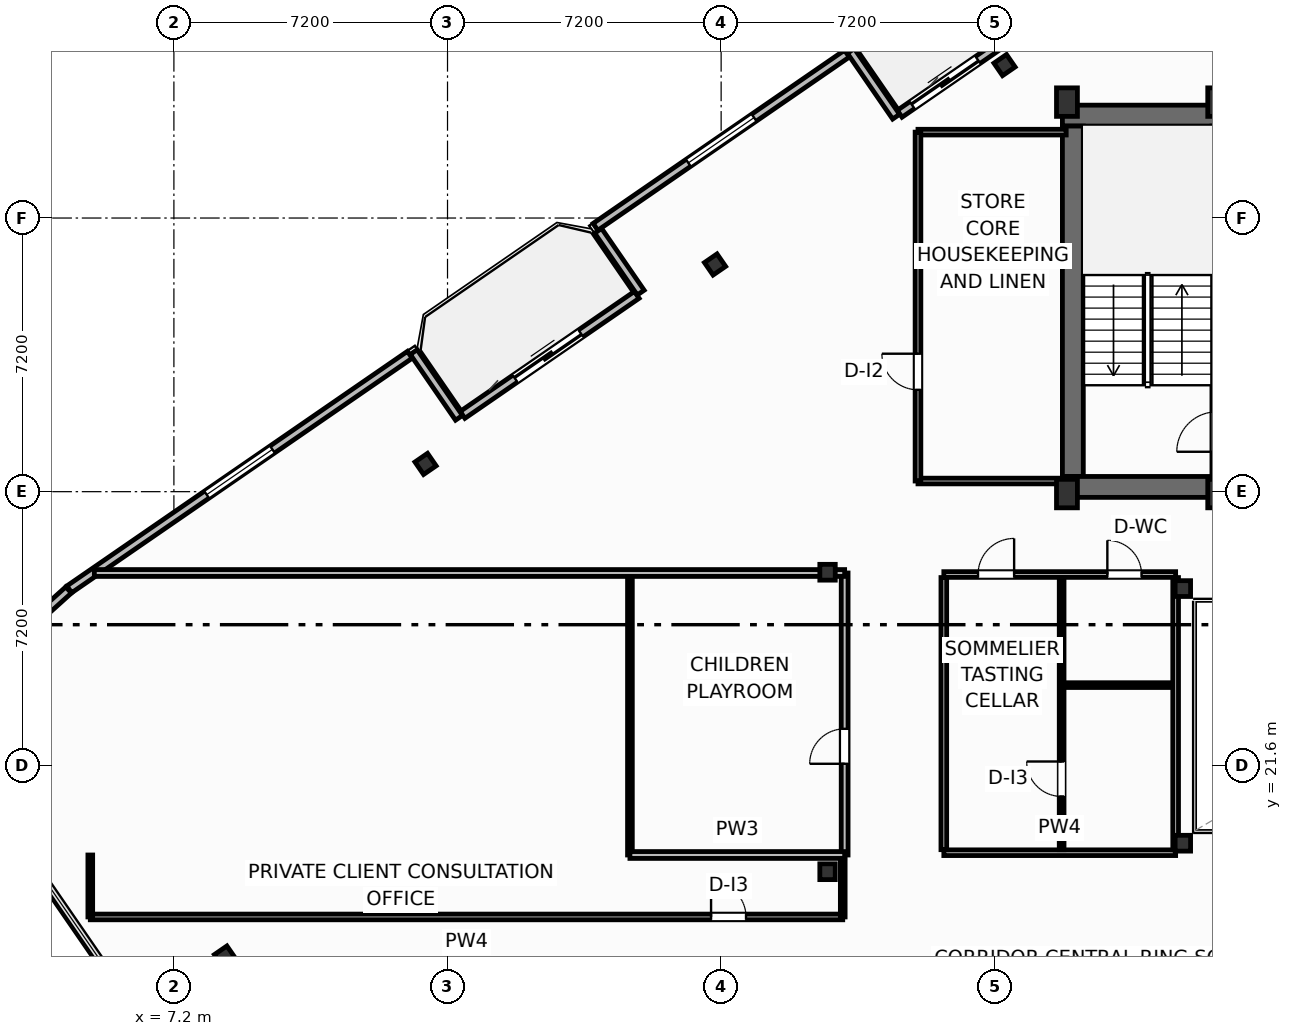
"""IFC4 building model, lengths in metres.
Left out: names, types, materials, properties, quantities, classifications, styles, units other than length and angle.
Written with IfcOpenShell. Run it as: python <this file> out.ifc"""

import sys

from ifc_helpers import new_model, si_unit, direction, frame, frame_2d, origin, origin_2d, place, context, subcontext, project, spatial, rectangle, i_section, extrude, element, fill, save


model = new_model("IFC4")
c1 = context("Model", 3, precision=1e-05, world=origin(), true_north=direction((0.0, 1.0)))
c2 = subcontext(c1, "Body", "Model", "MODEL_VIEW")
j1 = project(units=[si_unit("LENGTHUNIT", "METRE"), si_unit("PLANEANGLEUNIT", "RADIAN")], contexts=[c1])
p1 = place(None, origin())
s1 = spatial("IfcSite", under=j1, at=p1, CompositionType="ELEMENT")
p2 = place(p1, origin())
s2 = spatial("IfcBuilding", under=s1, at=p2, CompositionType="ELEMENT")
p3 = place(p2, frame((0.0, 0.0, 261.9)))
s3 = spatial("IfcBuildingStorey", under=s2, at=p3, CompositionType="ELEMENT", Elevation=261.9)
for number, where, z_axis, x_axis in (
    (1, (30.7, 28.75, 0.0), (0.0, 0.0, 1.0), (1.0, 0.0, 0.0)),
    (2, (34.68, 28.75, 0.0), (0.0, 0.0, 1.0), (1.0, 0.0, 0.0)),
    (3, (30.7, 39.05, 0.0), (0.0, 0.0, 1.0), (1.0, 0.0, 0.0)),
    (4, (34.68, 39.05, 0.0), (0.0, 0.0, 1.0), (1.0, 0.0, 0.0)),
):
    element("IfcColumn", number, at=place(p3, frame(where, z_axis=z_axis, x_axis=x_axis)), inside=s3, PredefinedType="COLUMN", context=c2, shape_type="SweptSolid", body=[
        extrude(rectangle(XDim=0.55, YDim=0.75, at=origin_2d()), origin(), (0.0, 0.0, 1.0), 3.7),
    ])
for number, where, z_axis, x_axis in (
    (5, (33.75, 19.55, 0.0), (0.0, 0.0, 1.0), (1.0, 0.0, 0.0)),
    (6, (33.75, 26.25, 0.0), (0.0, 0.0, 1.0), (1.0, 0.0, 0.0)),
    (7, (24.4, 18.8, 0.0), (0.0, 0.0, 1.0), (1.0, 0.0, 0.0)),
    (8, (24.4, 26.68, 0.0), (0.0, 0.0, 1.0), (1.0, 0.0, 0.0)),
):
    element("IfcColumn", number, at=place(p3, frame(where, z_axis=z_axis, x_axis=x_axis)), inside=s3, PredefinedType="COLUMN", context=c2, shape_type="SweptSolid", body=[
        extrude(i_section(OverallWidth=0.406, OverallDepth=0.416, WebThickness=0.03, FlangeThickness=0.048, FilletRadius=0.025, at=origin_2d()), origin(), (0.0, 0.0, 1.0), 3.7),
    ])
p4 = place(p3, frame((30.58, 38.695, 0.0), z_axis=(0.0, 0.0, 1.0), x_axis=(1.0, 0.0, 0.0)))
e9 = element("IfcWall", 9, at=p4, inside=s3, PredefinedType="SHEAR", context=c2, shape_type="SweptSolid", body=[
    extrude(rectangle(XDim=17.24, YDim=0.55, at=frame_2d((8.62, 0.0))), origin(), (0.0, 0.0, 1.0), 3.45),
])
p5 = place(p3, frame((30.855, 29.2, 0.0), z_axis=(0.0, 0.0, 1.0), x_axis=(0.0, 1.0, 0.0)))
e10 = element("IfcWall", 10, at=p5, inside=s3, PredefinedType="SHEAR", context=c2, shape_type="SweptSolid", body=[
    extrude(rectangle(XDim=9.22, YDim=0.55, at=frame_2d((4.61, 0.0))), origin(), (0.0, 0.0, 1.0), 3.45),
])
p6 = place(p3, frame((30.58, 28.925, 0.0), z_axis=(0.0, 0.0, 1.0), x_axis=(1.0, 0.0, 0.0)))
e11 = element("IfcWall", 11, at=p6, inside=s3, PredefinedType="SHEAR", context=c2, shape_type="SweptSolid", body=[
    extrude(rectangle(XDim=4.22, YDim=0.55, at=frame_2d((2.11, 0.0))), origin(), (0.0, 0.0, 1.0), 3.45),
])
p7 = place(p3, frame((34.64, 29.2, 0.0), z_axis=(0.0, 0.0, 1.0), x_axis=(0.0, 1.0, 0.0)))
e12 = element("IfcWall", 12, at=p7, inside=s3, PredefinedType="SHEAR", context=c2, shape_type="SweptSolid", body=[
    extrude(rectangle(XDim=9.22, YDim=0.25, at=frame_2d((4.61, 0.0))), origin(), (0.0, 0.0, 1.0), 3.45),
])
p8 = place(p7, frame((0.65, 0.0, 0.0)))
e13 = element("IfcOpeningElement", 13, at=p8, cuts=e12, PredefinedType="OPENING", context=c2, shape_type="SweptSolid", body=[
    extrude(rectangle(XDim=1.05, YDim=2.15, at=frame_2d((0.525, 1.075))), frame((0.0, 0.135, 0.0), z_axis=(0.0, -1.0, 0.0), x_axis=(1.0, 0.0, 0.0)), (0.0, 0.0, 1.0), 0.27),
])
for number, where, z_axis, x_axis in (
    (14, (29.057, 40.025, 0.0), (0.0, 0.0, 1.0), (0.824, 0.567, 0.0)),
    (15, (21.44, 34.778, 0.0), (0.0, 0.0, 1.0), (0.824, 0.567, 0.0)),
    (16, (13.822, 29.53, 0.0), (0.0, 0.0, 1.0), (0.824, 0.567, 0.0)),
    (17, (8.543, 16.569, 0.0), (0.0, 0.0, 1.0), (0.824, 0.567, 0.0)),
):
    element("IfcColumn", number, at=place(p3, frame(where, z_axis=z_axis, x_axis=x_axis)), inside=s3, PredefinedType="COLUMN", context=c2, shape_type="SweptSolid", body=[
        extrude(i_section(OverallWidth=0.401, OverallDepth=0.399, WebThickness=0.025, FlangeThickness=0.04, FilletRadius=0.022, at=origin_2d()), origin(), (0.0, 0.0, 1.0), 3.7),
    ])
p9 = place(p3, frame((14.795, 30.82, 0.0), z_axis=(0.0, 0.0, 1.0), x_axis=(0.823541290762, 0.567256328665, 0.0)))
e18 = element("IfcWall", 18, at=p9, inside=s3, PredefinedType="SOLIDWALL", context=c2, shape_type="SweptSolid", body=[
    extrude(rectangle(XDim=5.567, YDim=0.22, at=frame_2d((2.784, 0.0))), origin(), (0.0, 0.0, 1.0), 2.73),
])
p10 = place(p9, frame((1.68, 0.0, 0.0)))
e19 = element("IfcOpeningElement", 19, at=p10, cuts=e18, PredefinedType="OPENING", context=c2, shape_type="SweptSolid", body=[
    extrude(rectangle(XDim=2.1, YDim=2.3, at=frame_2d((1.05, 1.15))), frame((0.0, 0.12, 0.0), z_axis=(0.0, -1.0, 0.0), x_axis=(1.0, 0.0, 0.0)), (0.0, 0.0, 1.0), 0.24),
])
p11 = place(p3, frame((26.297, 38.743, 0.0), z_axis=(0.0, 0.0, 1.0), x_axis=(0.823534636215, 0.567265989598, 0.0)))
e20 = element("IfcWall", 20, at=p11, inside=s3, PredefinedType="SOLIDWALL", context=c2, shape_type="SweptSolid", body=[
    extrude(rectangle(XDim=6.0, YDim=0.22, at=frame_2d((3.0, 0.0))), origin(), (0.0, 0.0, 1.0), 2.73),
])
p12 = place(p11, frame((0.4, 0.0, 0.0)))
e21 = element("IfcOpeningElement", 21, at=p12, cuts=e20, PredefinedType="OPENING", context=c2, shape_type="SweptSolid", body=[
    extrude(rectangle(XDim=2.1, YDim=2.3, at=frame_2d((1.05, 1.15))), frame((0.0, 0.12, 0.0), z_axis=(0.0, -1.0, 0.0), x_axis=(1.0, 0.0, 0.0)), (0.0, 0.0, 1.0), 0.24),
])
p13 = place(p3, frame((26.204, 38.667, 0.0), z_axis=(0.0, 0.0, 1.0), x_axis=(-0.567219383419, 0.823566737474, 0.0)))
e22 = element("IfcWall", 22, at=p13, inside=s3, PredefinedType="SOLIDWALL", context=c2, shape_type="SweptSolid", body=[
    extrude(rectangle(XDim=2.1, YDim=0.22, at=frame_2d((1.05, 0.0))), origin(), (0.0, 0.0, 1.0), 2.73),
])
p14 = place(p3, frame((24.91, 40.325, 0.0), z_axis=(0.0, 0.0, 1.0), x_axis=(-0.823521165086, -0.56728554596, 0.0)))
e23 = element("IfcWall", 23, at=p14, inside=s3, PredefinedType="SOLIDWALL", context=c2, shape_type="SweptSolid", body=[
    extrude(rectangle(XDim=8.035, YDim=0.22, at=frame_2d((4.018, 0.0))), origin(), (0.0, 0.0, 1.0), 2.73),
])
p15 = place(p14, frame((2.968, 0.0, 0.8)))
e24 = element("IfcOpeningElement", 24, at=p15, cuts=e23, PredefinedType="OPENING", context=c2, shape_type="SweptSolid", body=[
    extrude(rectangle(XDim=2.1, YDim=1.75, at=frame_2d((1.05, 0.875))), frame((0.0, 0.12, 0.0), z_axis=(0.0, -1.0, 0.0), x_axis=(1.0, 0.0, 0.0)), (0.0, 0.0, 1.0), 0.24),
])
p16 = place(p3, frame((18.364, 35.664, 0.0), z_axis=(0.0, 0.0, 1.0), x_axis=(0.567215821234, -0.823569190865, 0.0)))
e25 = element("IfcWall", 25, at=p16, inside=s3, PredefinedType="SOLIDWALL", context=c2, shape_type="SweptSolid", body=[
    extrude(rectangle(XDim=1.975, YDim=0.22, at=frame_2d((0.988, 0.0))), origin(), (0.0, 0.0, 1.0), 2.73),
])
p17 = place(p3, frame((14.702, 30.744, 0.0), z_axis=(0.0, 0.0, 1.0), x_axis=(-0.567352541689, 0.823475010816, 0.0)))
e26 = element("IfcWall", 26, at=p17, inside=s3, PredefinedType="SOLIDWALL", context=c2, shape_type="SweptSolid", body=[
    extrude(rectangle(XDim=2.1, YDim=0.22, at=frame_2d((1.05, 0.0))), origin(), (0.0, 0.0, 1.0), 2.73),
])
p18 = place(p3, frame((13.408, 32.402, 0.0), z_axis=(0.0, 0.0, 1.0), x_axis=(-0.823527634633, -0.567276154087, 0.0)))
e27 = element("IfcWall", 27, at=p18, inside=s3, PredefinedType="SOLIDWALL", context=c2, shape_type="SweptSolid", body=[
    extrude(rectangle(XDim=10.88, YDim=0.22, at=frame_2d((5.44, 0.0))), origin(), (0.0, 0.0, 1.0), 2.73),
])
p19 = place(p18, frame((4.39, 0.0, 0.8)))
e28 = element("IfcOpeningElement", 28, at=p19, cuts=e27, PredefinedType="OPENING", context=c2, shape_type="SweptSolid", body=[
    extrude(rectangle(XDim=2.1, YDim=1.75, at=frame_2d((1.05, 0.875))), frame((0.0, 0.12, 0.0), z_axis=(0.0, -1.0, 0.0), x_axis=(1.0, 0.0, 0.0)), (0.0, 0.0, 1.0), 0.24),
])
p20 = place(p3, frame((4.429, 26.213, 0.0), z_axis=(0.0, 0.0, 1.0), x_axis=(-0.742414330744, -0.669941013453, 0.0)))
e29 = element("IfcWall", 29, at=p20, inside=s3, PredefinedType="SOLIDWALL", context=c2, shape_type="SweptSolid", body=[
    extrude(rectangle(XDim=1.257, YDim=0.22, at=frame_2d((0.628, 0.0))), origin(), (0.0, 0.0, 1.0), 2.73),
])
p21 = place(p3, frame((5.0, 17.61, 0.0), z_axis=(0.0, 0.0, 1.0), x_axis=(1.0, 0.0, 0.0)))
e30 = element("IfcWall", 30, at=p21, inside=s3, PredefinedType="PARTITIONING", context=c2, shape_type="SweptSolid", body=[
    extrude(rectangle(XDim=19.8, YDim=0.15, at=frame_2d((9.9, 0.0))), origin(), (0.0, 0.0, 1.0), 2.739),
])
p22 = place(p21, frame((16.335, 0.0, 0.0)))
e31 = element("IfcOpeningElement", 31, at=p22, cuts=e30, PredefinedType="OPENING", context=c2, shape_type="SweptSolid", body=[
    extrude(rectangle(XDim=0.92, YDim=2.05, at=frame_2d((0.46, 1.025))), frame((0.0, 0.085, 0.0), z_axis=(0.0, -1.0, 0.0), x_axis=(1.0, 0.0, 0.0)), (0.0, 0.0, 1.0), 0.17),
])
for number, where, z_axis, x_axis in (
    (32, (5.0, 17.61, 0.0), (0.0, 0.0, 1.0), (0.0, 1.0, 0.0)),
    (33, (24.8, 17.61, 0.0), (0.0, 0.0, 1.0), (0.0, 1.0, 0.0)),
):
    element("IfcWall", number, at=place(p3, frame(where, z_axis=z_axis, x_axis=x_axis)), inside=s3, PredefinedType="PARTITIONING", context=c2, shape_type="SweptSolid", body=[
        extrude(rectangle(XDim=1.63, YDim=0.125, at=frame_2d((0.815, 0.0))), origin(), (0.0, 0.0, 1.0), 3.45),
    ])
p23 = place(p3, frame((24.85, 19.24, 0.0), z_axis=(0.0, 0.0, 1.0), x_axis=(0.0, 1.0, 0.0)))
e34 = element("IfcWall", 34, at=p23, inside=s3, PredefinedType="PARTITIONING", context=c2, shape_type="SweptSolid", body=[
    extrude(rectangle(XDim=7.42, YDim=0.18, at=frame_2d((3.71, 0.0))), origin(), (0.0, 0.0, 1.0), 3.45),
])
p24 = place(p23, frame((2.4, 0.0, 0.0)))
e35 = element("IfcOpeningElement", 35, at=p24, cuts=e34, PredefinedType="OPENING", context=c2, shape_type="SweptSolid", body=[
    extrude(rectangle(XDim=0.92, YDim=2.05, at=frame_2d((0.46, 1.025))), frame((0.0, 0.1, 0.0), z_axis=(0.0, -1.0, 0.0), x_axis=(1.0, 0.0, 0.0)), (0.0, 0.0, 1.0), 0.2),
])
p25 = place(p3, frame((19.2, 19.24, 0.0), z_axis=(0.0, 0.0, 1.0), x_axis=(0.0, 1.0, 0.0)))
e36 = element("IfcWall", 36, at=p25, inside=s3, PredefinedType="PARTITIONING", context=c2, shape_type="SweptSolid", body=[
    extrude(rectangle(XDim=7.42, YDim=0.125, at=frame_2d((3.71, 0.0))), origin(), (0.0, 0.0, 1.0), 3.45),
])
p26 = place(p3, frame((19.2, 19.24, 0.0), z_axis=(0.0, 0.0, 1.0), x_axis=(1.0, 0.0, 0.0)))
e37 = element("IfcWall", 37, at=p26, inside=s3, PredefinedType="PARTITIONING", context=c2, shape_type="SweptSolid", body=[
    extrude(rectangle(XDim=5.65, YDim=0.18, at=frame_2d((2.825, 0.0))), origin(), (0.0, 0.0, 1.0), 3.45),
])
p27 = place(p3, frame((5.107, 26.66, 0.0), z_axis=(0.0, 0.0, 1.0), x_axis=(1.0, 0.0, 0.0)))
e38 = element("IfcWall", 38, at=p27, inside=s3, PredefinedType="PARTITIONING", context=c2, shape_type="SweptSolid", body=[
    extrude(rectangle(XDim=19.743, YDim=0.18, at=frame_2d((9.872, 0.0))), origin(), (0.0, 0.0, 1.0), 2.662),
])
p28 = place(p3, frame((27.46, 26.62, 0.0), z_axis=(0.0, 0.0, 1.0), x_axis=(1.0, 0.0, 0.0)))
e39 = element("IfcWall", 39, at=p28, inside=s3, PredefinedType="PARTITIONING", context=c2, shape_type="SweptSolid", body=[
    extrude(rectangle(XDim=6.1, YDim=0.15, at=frame_2d((3.05, 0.0))), origin(), (0.0, 0.0, 1.0), 2.662),
])
p29 = place(p28, frame((0.9, 0.0, 0.0)))
e40 = element("IfcOpeningElement", 40, at=p29, cuts=e39, PredefinedType="OPENING", context=c2, shape_type="SweptSolid", body=[
    extrude(rectangle(XDim=0.95, YDim=2.05, at=frame_2d((0.475, 1.025))), frame((0.0, 0.085, 0.0), z_axis=(0.0, -1.0, 0.0), x_axis=(1.0, 0.0, 0.0)), (0.0, 0.0, 1.0), 0.17),
])
p30 = place(p28, frame((4.303, 0.0, 0.0)))
e41 = element("IfcOpeningElement", 41, at=p30, cuts=e39, PredefinedType="OPENING", context=c2, shape_type="SweptSolid", body=[
    extrude(rectangle(XDim=0.9, YDim=2.05, at=frame_2d((0.45, 1.025))), frame((0.0, 0.085, 0.0), z_axis=(0.0, -1.0, 0.0), x_axis=(1.0, 0.0, 0.0)), (0.0, 0.0, 1.0), 0.17),
])
p31 = place(p3, frame((27.46, 19.3, 0.0), z_axis=(0.0, 0.0, 1.0), x_axis=(1.0, 0.0, 0.0)))
e42 = element("IfcWall", 42, at=p31, inside=s3, PredefinedType="PARTITIONING", context=c2, shape_type="SweptSolid", body=[
    extrude(rectangle(XDim=6.1, YDim=0.15, at=frame_2d((3.05, 0.0))), origin(), (0.0, 0.0, 1.0), 2.662),
])
p32 = place(p3, frame((30.56, 19.38, 0.0), z_axis=(0.0, 0.0, 1.0), x_axis=(0.0, 1.0, 0.0)))
e43 = element("IfcWall", 43, at=p32, inside=s3, PredefinedType="PARTITIONING", context=c2, shape_type="SweptSolid", body=[
    extrude(rectangle(XDim=7.16, YDim=0.125, at=frame_2d((3.58, 0.0))), origin(), (0.0, 0.0, 1.0), 3.45),
])
p33 = place(p32, frame((1.4, 0.0, 0.0)))
e44 = element("IfcOpeningElement", 44, at=p33, cuts=e43, PredefinedType="OPENING", context=c2, shape_type="SweptSolid", body=[
    extrude(rectangle(XDim=0.92, YDim=2.05, at=frame_2d((0.46, 1.025))), frame((0.0, 0.073, 0.0), z_axis=(0.0, -1.0, 0.0), x_axis=(1.0, 0.0, 0.0)), (0.0, 0.0, 1.0), 0.145),
])
p34 = place(p3, frame((30.64, 23.71, 0.0), z_axis=(0.0, 0.0, 1.0), x_axis=(1.0, 0.0, 0.0)))
e45 = element("IfcWall", 45, at=p34, inside=s3, PredefinedType="PARTITIONING", context=c2, shape_type="SweptSolid", body=[
    extrude(rectangle(XDim=2.88, YDim=0.125, at=frame_2d((1.44, 0.0))), origin(), (0.0, 0.0, 1.0), 3.45),
])
p35 = place(p3, frame((27.46, 19.38, 0.0), z_axis=(0.0, 0.0, 1.0), x_axis=(0.0, 1.0, 0.0)))
e46 = element("IfcWall", 46, at=p35, inside=s3, PredefinedType="PARTITIONING", context=c2, shape_type="SweptSolid", body=[
    extrude(rectangle(XDim=7.16, YDim=0.15, at=frame_2d((3.58, 0.0))), origin(), (0.0, 0.0, 1.0), 3.45),
])
p36 = place(p3, frame((33.56, 19.38, 0.0), z_axis=(0.0, 0.0, 1.0), x_axis=(0.0, 1.0, 0.0)))
e47 = element("IfcWall", 47, at=p36, inside=s3, PredefinedType="PARTITIONING", context=c2, shape_type="SweptSolid", body=[
    extrude(rectangle(XDim=7.16, YDim=0.15, at=frame_2d((3.58, 0.0))), origin(), (0.0, 0.0, 1.0), 2.824),
])
p37 = place(p3, frame((26.78, 29.08, 0.0), z_axis=(0.0, 0.0, 1.0), x_axis=(1.0, 0.0, 0.0)))
e48 = element("IfcWall", 48, at=p37, inside=s3, PredefinedType="PARTITIONING", context=c2, shape_type="SweptSolid", body=[
    extrude(rectangle(XDim=3.8, YDim=0.15, at=frame_2d((1.9, 0.0))), origin(), (0.0, 0.0, 1.0), 3.45),
])
p38 = place(p3, frame((26.78, 38.26, 0.0), z_axis=(0.0, 0.0, 1.0), x_axis=(1.0, 0.0, 0.0)))
e49 = element("IfcWall", 49, at=p38, inside=s3, PredefinedType="PARTITIONING", context=c2, shape_type="SweptSolid", body=[
    extrude(rectangle(XDim=3.9, YDim=0.15, at=frame_2d((1.95, 0.0))), origin(), (0.0, 0.0, 1.0), 3.45),
])
p39 = place(p3, frame((26.78, 29.08, 0.0), z_axis=(0.0, 0.0, 1.0), x_axis=(0.0, 1.0, 0.0)))
e50 = element("IfcWall", 50, at=p39, inside=s3, PredefinedType="PARTITIONING", context=c2, shape_type="SweptSolid", body=[
    extrude(rectangle(XDim=9.18, YDim=0.15, at=frame_2d((4.59, 0.0))), origin(), (0.0, 0.0, 1.0), 3.45),
])
p40 = place(p39, frame((2.4, 0.0, 0.0)))
e51 = element("IfcOpeningElement", 51, at=p40, cuts=e50, PredefinedType="OPENING", context=c2, shape_type="SweptSolid", body=[
    extrude(rectangle(XDim=0.95, YDim=2.05, at=frame_2d((0.475, 1.025))), frame((0.0, 0.085, 0.0), z_axis=(0.0, -1.0, 0.0), x_axis=(1.0, 0.0, 0.0)), (0.0, 0.0, 1.0), 0.17),
])
p41 = place(p10, origin())
e52 = element("IfcDoor", 52, at=p41, inside=s3, OperationType="SLIDING_TO_LEFT", PredefinedType="DOOR", context=c2, shape_type="SweptSolid", body=[
    extrude(rectangle(XDim=2.1, YDim=2.3, at=frame_2d((1.05, 1.15))), frame((0.0, 0.025, 0.0), z_axis=(0.0, -1.0, 0.0), x_axis=(1.0, 0.0, 0.0)), (0.0, 0.0, 1.0), 0.05),
])
fill(e19, e52)
p42 = place(p12, origin())
e53 = element("IfcDoor", 53, at=p42, inside=s3, OperationType="SLIDING_TO_LEFT", PredefinedType="DOOR", context=c2, shape_type="SweptSolid", body=[
    extrude(rectangle(XDim=2.1, YDim=2.3, at=frame_2d((1.05, 1.15))), frame((0.0, 0.025, 0.0), z_axis=(0.0, -1.0, 0.0), x_axis=(1.0, 0.0, 0.0)), (0.0, 0.0, 1.0), 0.05),
])
fill(e21, e53)
p43 = place(p15, origin())
e54 = element("IfcWindow", 54, at=p43, inside=s3, PartitioningType="SINGLE_PANEL", PredefinedType="WINDOW", context=c2, shape_type="SweptSolid", body=[
    extrude(rectangle(XDim=2.1, YDim=1.75, at=frame_2d((1.05, 0.875))), frame((0.0, 0.03, 0.0), z_axis=(0.0, -1.0, 0.0), x_axis=(1.0, 0.0, 0.0)), (0.0, 0.0, 1.0), 0.06),
])
fill(e24, e54)
p44 = place(p19, origin())
e55 = element("IfcWindow", 55, at=p44, inside=s3, PartitioningType="SINGLE_PANEL", PredefinedType="WINDOW", context=c2, shape_type="SweptSolid", body=[
    extrude(rectangle(XDim=2.1, YDim=1.75, at=frame_2d((1.05, 0.875))), frame((0.0, 0.03, 0.0), z_axis=(0.0, -1.0, 0.0), x_axis=(1.0, 0.0, 0.0)), (0.0, 0.0, 1.0), 0.06),
])
fill(e28, e55)
p45 = place(p22, origin())
e56 = element("IfcDoor", 56, at=p45, inside=s3, OperationType="SINGLE_SWING_LEFT", PredefinedType="DOOR", context=c2, shape_type="SweptSolid", body=[
    extrude(rectangle(XDim=0.92, YDim=2.05, at=frame_2d((0.46, 1.025))), frame((0.0, 0.025, 0.0), z_axis=(0.0, -1.0, 0.0), x_axis=(1.0, 0.0, 0.0)), (0.0, 0.0, 1.0), 0.05),
])
fill(e31, e56)
p46 = place(p24, origin())
e57 = element("IfcDoor", 57, at=p46, inside=s3, OperationType="SINGLE_SWING_LEFT", PredefinedType="DOOR", context=c2, shape_type="SweptSolid", body=[
    extrude(rectangle(XDim=0.92, YDim=2.05, at=frame_2d((0.46, 1.025))), frame((0.0, 0.025, 0.0), z_axis=(0.0, -1.0, 0.0), x_axis=(1.0, 0.0, 0.0)), (0.0, 0.0, 1.0), 0.05),
])
fill(e35, e57)
p47 = place(p29, origin())
e58 = element("IfcDoor", 58, at=p47, inside=s3, OperationType="SINGLE_SWING_RIGHT", PredefinedType="DOOR", context=c2, shape_type="SweptSolid", body=[
    extrude(rectangle(XDim=0.95, YDim=2.05, at=frame_2d((0.475, 1.025))), frame((0.0, 0.025, 0.0), z_axis=(0.0, -1.0, 0.0), x_axis=(1.0, 0.0, 0.0)), (0.0, 0.0, 1.0), 0.05),
])
fill(e40, e58)
p48 = place(p30, origin())
e59 = element("IfcDoor", 59, at=p48, inside=s3, OperationType="SINGLE_SWING_LEFT", PredefinedType="DOOR", context=c2, shape_type="SweptSolid", body=[
    extrude(rectangle(XDim=0.9, YDim=2.05, at=frame_2d((0.45, 1.025))), frame((0.0, 0.025, 0.0), z_axis=(0.0, -1.0, 0.0), x_axis=(1.0, 0.0, 0.0)), (0.0, 0.0, 1.0), 0.05),
])
fill(e41, e59)
p49 = place(p33, origin())
e60 = element("IfcDoor", 60, at=p49, inside=s3, OperationType="SINGLE_SWING_RIGHT", PredefinedType="DOOR", context=c2, shape_type="SweptSolid", body=[
    extrude(rectangle(XDim=0.92, YDim=2.05, at=frame_2d((0.46, 1.025))), frame((0.0, 0.025, 0.0), z_axis=(0.0, -1.0, 0.0), x_axis=(1.0, 0.0, 0.0)), (0.0, 0.0, 1.0), 0.05),
])
fill(e44, e60)
p50 = place(p40, origin())
e61 = element("IfcDoor", 61, at=p50, inside=s3, OperationType="SINGLE_SWING_RIGHT", PredefinedType="DOOR", context=c2, shape_type="SweptSolid", body=[
    extrude(rectangle(XDim=0.95, YDim=2.05, at=frame_2d((0.475, 1.025))), frame((0.0, 0.025, 0.0), z_axis=(0.0, -1.0, 0.0), x_axis=(1.0, 0.0, 0.0)), (0.0, 0.0, 1.0), 0.05),
])
fill(e51, e61)
save(model, sys.argv[1])
